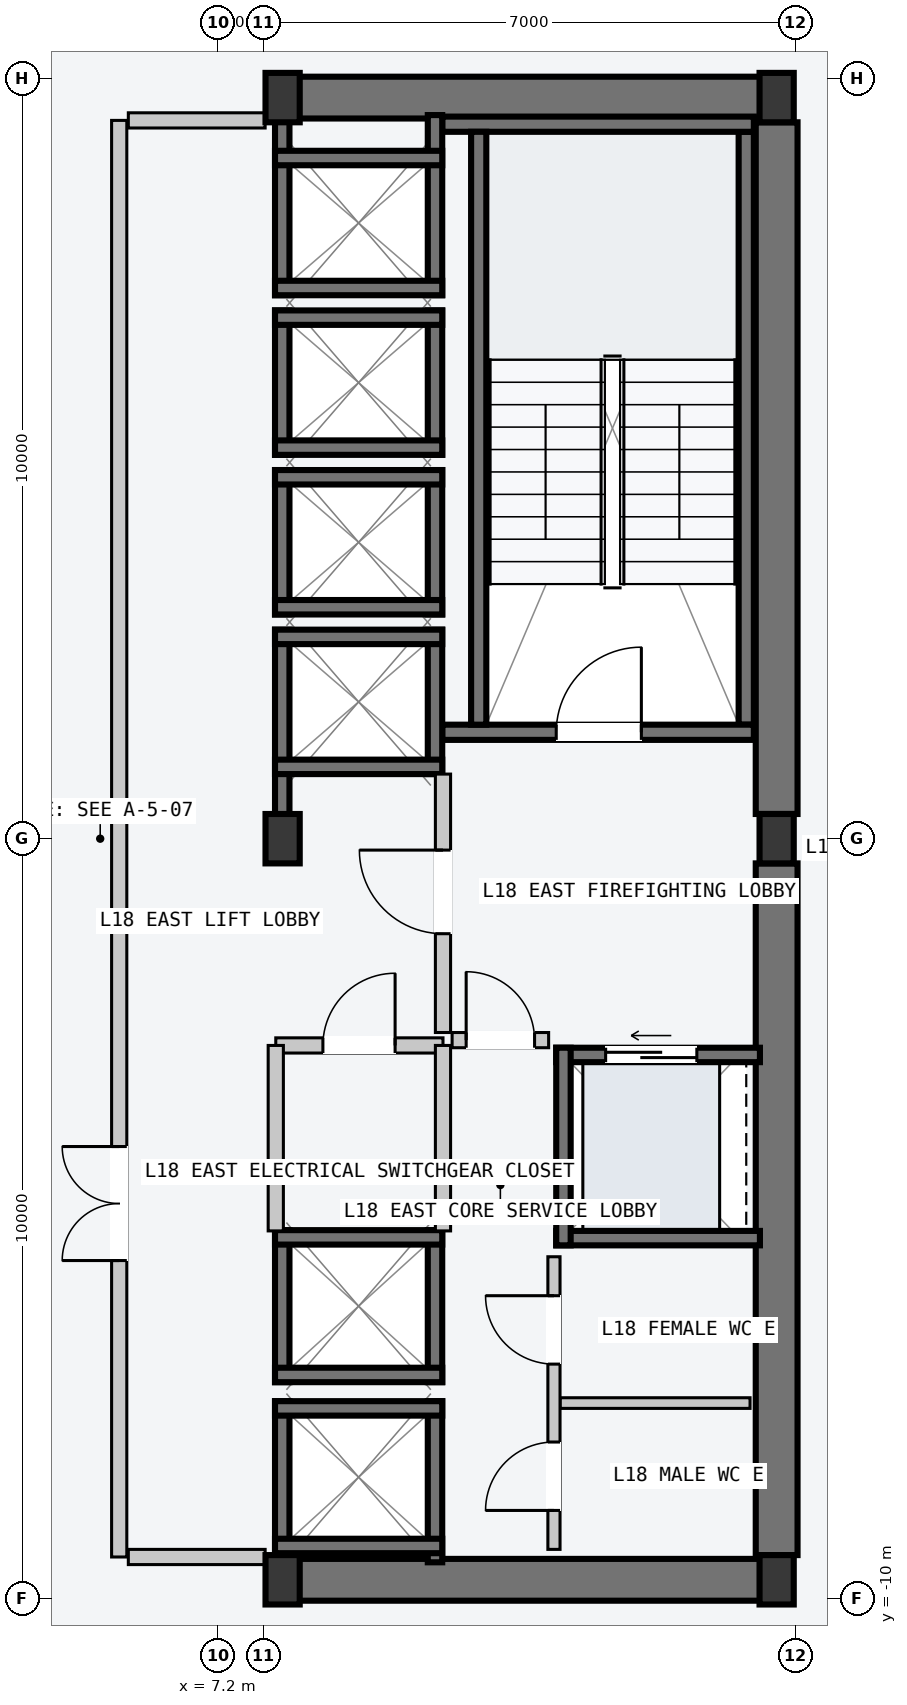
"""IFC4 building model, lengths in metres.
Left out: names, types, materials, properties, quantities, classifications, styles, units other than length and angle.
Written with IfcOpenShell. Run it as: python <this file> out.ifc"""

import sys

from ifc_helpers import new_model, si_unit, direction, frame, frame_2d, origin, origin_2d, place, context, subcontext, project, spatial, rectangle, i_section, extrude, element, fill, save


model = new_model("IFC4")
c1 = context("Model", 3, precision=1e-05, world=origin(), true_north=direction((0.0, 1.0)))
c2 = subcontext(c1, "Body", "Model", "MODEL_VIEW")
j1 = project(units=[si_unit("LENGTHUNIT", "METRE"), si_unit("PLANEANGLEUNIT", "RADIAN")], contexts=[c1])
p1 = place(None, origin())
s1 = spatial("IfcSite", under=j1, at=p1, CompositionType="ELEMENT")
p2 = place(p1, origin())
s2 = spatial("IfcBuilding", under=s1, at=p2, CompositionType="ELEMENT")
p3 = place(p2, frame((0.0, 0.0, 70.8)))
s3 = spatial("IfcBuildingStorey", under=s2, at=p3, CompositionType="ELEMENT", Elevation=70.8)
for number, where, z_axis, x_axis in (
    (1, (8.07, -9.75, -0.2), (0.0, 0.0, 1.0), (1.0, 0.0, 0.0)),
    (2, (8.07, 9.75, -0.2), (0.0, 0.0, 1.0), (1.0, 0.0, 0.0)),
):
    element("IfcWall", number, at=place(p3, frame(where, z_axis=z_axis, x_axis=x_axis)), inside=s3, PredefinedType="SHEAR", context=c2, shape_type="SweptSolid", body=[
        extrude(rectangle(XDim=6.46, YDim=0.55, at=frame_2d((3.23, 0.0))), origin(), (0.0, 0.0, 1.0), 3.6),
    ])
for number, where, z_axis, x_axis in (
    (3, (14.55, -9.425, -0.2), (0.0, 0.0, 1.0), (0.0, 1.0, 0.0)),
    (4, (14.55, 0.325, -0.2), (0.0, 0.0, 1.0), (0.0, 1.0, 0.0)),
):
    element("IfcWall", number, at=place(p3, frame(where, z_axis=z_axis, x_axis=x_axis)), inside=s3, PredefinedType="SHEAR", context=c2, shape_type="SweptSolid", body=[
        extrude(rectangle(XDim=9.1, YDim=0.55, at=frame_2d((4.55, 0.0))), origin(), (0.0, 0.0, 1.0), 3.6),
    ])
p4 = place(p3, frame((14.15, 1.5, -0.2), z_axis=(0.0, 0.0, 1.0), x_axis=(0.0, 1.0, 0.0)))
e5 = element("IfcWall", 5, at=p4, inside=s3, PredefinedType="SOLIDWALL", context=c2, shape_type="SweptSolid", body=[
    extrude(rectangle(XDim=7.8, YDim=0.2, at=frame_2d((3.9, 0.0))), origin(), (0.0, 0.0, 1.0), 3.6),
])
p5 = place(p3, frame((10.15, 1.4, -0.2), z_axis=(0.0, 0.0, 1.0), x_axis=(1.0, 0.0, 0.0)))
e6 = element("IfcWall", 6, at=p5, inside=s3, PredefinedType="SOLIDWALL", context=c2, shape_type="SweptSolid", body=[
    extrude(rectangle(XDim=4.1, YDim=0.2, at=frame_2d((2.05, 0.0))), origin(), (0.0, 0.0, 1.0), 3.6),
])
p6 = place(p5, frame((1.5, 0.0, 0.2)))
e7 = element("IfcOpeningElement", 7, at=p6, cuts=e6, PredefinedType="OPENING", context=c2, shape_type="SweptSolid", body=[
    extrude(rectangle(XDim=1.12, YDim=2.18, at=frame_2d((0.56, 1.09))), frame((0.0, 0.11, 0.0), z_axis=(0.0, -1.0, 0.0), x_axis=(1.0, 0.0, 0.0)), (0.0, 0.0, 1.0), 0.22),
])
p7 = place(p3, frame((10.15, 9.4, -0.2), z_axis=(0.0, 0.0, 1.0), x_axis=(1.0, 0.0, 0.0)))
e8 = element("IfcWall", 8, at=p7, inside=s3, PredefinedType="SOLIDWALL", context=c2, shape_type="SweptSolid", body=[
    extrude(rectangle(XDim=4.1, YDim=0.2, at=frame_2d((2.05, 0.0))), origin(), (0.0, 0.0, 1.0), 3.6),
])
p8 = place(p3, frame((10.63, 1.5, -0.2), z_axis=(0.0, 0.0, 1.0), x_axis=(0.0, 1.0, 0.0)))
e9 = element("IfcWall", 9, at=p8, inside=s3, PredefinedType="SOLIDWALL", context=c2, shape_type="SweptSolid", body=[
    extrude(rectangle(XDim=7.8, YDim=0.2, at=frame_2d((3.9, 0.0))), origin(), (0.0, 0.0, 1.0), 3.6),
])
for number, where, z_axis, x_axis in (
    (10, (8.05, -9.75, 0.0), (0.0, 0.0, 1.0), (1.0, 0.0, 0.0)),
    (11, (8.05, 0.0, 0.0), (0.0, 0.0, 1.0), (1.0, 0.0, 0.0)),
    (12, (8.05, 9.75, 0.0), (0.0, 0.0, 1.0), (1.0, 0.0, 0.0)),
    (13, (14.55, -9.75, 0.0), (0.0, 0.0, 1.0), (1.0, 0.0, 0.0)),
    (14, (14.55, 0.0, 0.0), (0.0, 0.0, 1.0), (1.0, 0.0, 0.0)),
    (15, (14.55, 9.75, 0.0), (0.0, 0.0, 1.0), (1.0, 0.0, 0.0)),
):
    element("IfcColumn", number, at=place(p3, frame(where, z_axis=z_axis, x_axis=x_axis)), inside=s3, PredefinedType="COLUMN", context=c2, shape_type="SweptSolid", body=[
        extrude(i_section(OverallWidth=0.45, OverallDepth=0.65, WebThickness=0.025, FlangeThickness=0.04, at=origin_2d()), origin(), (0.0, 0.0, 1.0), 3.6),
    ])
p9 = place(p3, frame((8.045, 0.21, -0.2), z_axis=(0.0, 0.0, 1.0), x_axis=(0.0, 1.0, 0.0)))
e16 = element("IfcWall", 16, at=p9, inside=s3, PredefinedType="SOLIDWALL", context=c2, shape_type="SweptSolid", body=[
    extrude(rectangle(XDim=2.54, YDim=0.19, at=frame_2d((1.27, 0.0))), origin(), (0.0, 0.0, 1.0), 3.6),
])
p10 = place(p3, frame((10.055, 0.85, -0.2), z_axis=(0.0, 0.0, 1.0), x_axis=(0.0, 1.0, 0.0)))
e17 = element("IfcWall", 17, at=p10, inside=s3, PredefinedType="SOLIDWALL", context=c2, shape_type="SweptSolid", body=[
    extrude(rectangle(XDim=1.9, YDim=0.19, at=frame_2d((0.95, 0.0))), origin(), (0.0, 0.0, 1.0), 3.6),
])
for number, where, z_axis, x_axis in (
    (18, (7.95, 2.655, -0.2), (0.0, 0.0, 1.0), (1.0, 0.0, 0.0)),
    (19, (7.95, 0.945, -0.2), (0.0, 0.0, 1.0), (1.0, 0.0, 0.0)),
):
    element("IfcWall", number, at=place(p3, frame(where, z_axis=z_axis, x_axis=x_axis)), inside=s3, PredefinedType="SOLIDWALL", context=c2, shape_type="SweptSolid", body=[
        extrude(rectangle(XDim=2.2, YDim=0.19, at=frame_2d((1.1, 0.0))), origin(), (0.0, 0.0, 1.0), 3.6),
    ])
for number, where, z_axis, x_axis in (
    (20, (8.045, 2.95, -0.2), (0.0, 0.0, 1.0), (0.0, 1.0, 0.0)),
    (21, (10.055, 2.95, -0.2), (0.0, 0.0, 1.0), (0.0, 1.0, 0.0)),
):
    element("IfcWall", number, at=place(p3, frame(where, z_axis=z_axis, x_axis=x_axis)), inside=s3, PredefinedType="SOLIDWALL", context=c2, shape_type="SweptSolid", body=[
        extrude(rectangle(XDim=1.9, YDim=0.19, at=frame_2d((0.95, 0.0))), origin(), (0.0, 0.0, 1.0), 3.6),
    ])
for number, where, z_axis, x_axis in (
    (22, (7.95, 4.755, -0.2), (0.0, 0.0, 1.0), (1.0, 0.0, 0.0)),
    (23, (7.95, 3.045, -0.2), (0.0, 0.0, 1.0), (1.0, 0.0, 0.0)),
):
    element("IfcWall", number, at=place(p3, frame(where, z_axis=z_axis, x_axis=x_axis)), inside=s3, PredefinedType="SOLIDWALL", context=c2, shape_type="SweptSolid", body=[
        extrude(rectangle(XDim=2.2, YDim=0.19, at=frame_2d((1.1, 0.0))), origin(), (0.0, 0.0, 1.0), 3.6),
    ])
for number, where, z_axis, x_axis in (
    (24, (8.045, 5.05, -0.2), (0.0, 0.0, 1.0), (0.0, 1.0, 0.0)),
    (25, (10.055, 5.05, -0.2), (0.0, 0.0, 1.0), (0.0, 1.0, 0.0)),
):
    element("IfcWall", number, at=place(p3, frame(where, z_axis=z_axis, x_axis=x_axis)), inside=s3, PredefinedType="SOLIDWALL", context=c2, shape_type="SweptSolid", body=[
        extrude(rectangle(XDim=1.9, YDim=0.19, at=frame_2d((0.95, 0.0))), origin(), (0.0, 0.0, 1.0), 3.6),
    ])
for number, where, z_axis, x_axis in (
    (26, (7.95, 6.855, -0.2), (0.0, 0.0, 1.0), (1.0, 0.0, 0.0)),
    (27, (7.95, 5.145, -0.2), (0.0, 0.0, 1.0), (1.0, 0.0, 0.0)),
):
    element("IfcWall", number, at=place(p3, frame(where, z_axis=z_axis, x_axis=x_axis)), inside=s3, PredefinedType="SOLIDWALL", context=c2, shape_type="SweptSolid", body=[
        extrude(rectangle(XDim=2.2, YDim=0.19, at=frame_2d((1.1, 0.0))), origin(), (0.0, 0.0, 1.0), 3.6),
    ])
for number, where, z_axis, x_axis in (
    (28, (8.045, 7.15, -0.2), (0.0, 0.0, 1.0), (0.0, 1.0, 0.0)),
    (29, (10.055, 7.15, -0.2), (0.0, 0.0, 1.0), (0.0, 1.0, 0.0)),
):
    element("IfcWall", number, at=place(p3, frame(where, z_axis=z_axis, x_axis=x_axis)), inside=s3, PredefinedType="SOLIDWALL", context=c2, shape_type="SweptSolid", body=[
        extrude(rectangle(XDim=2.37, YDim=0.19, at=frame_2d((1.185, 0.0))), origin(), (0.0, 0.0, 1.0), 3.6),
    ])
for number, where, z_axis, x_axis in (
    (30, (7.95, 8.955, -0.2), (0.0, 0.0, 1.0), (1.0, 0.0, 0.0)),
    (31, (7.95, 7.245, -0.2), (0.0, 0.0, 1.0), (1.0, 0.0, 0.0)),
):
    element("IfcWall", number, at=place(p3, frame(where, z_axis=z_axis, x_axis=x_axis)), inside=s3, PredefinedType="SOLIDWALL", context=c2, shape_type="SweptSolid", body=[
        extrude(rectangle(XDim=2.2, YDim=0.19, at=frame_2d((1.1, 0.0))), origin(), (0.0, 0.0, 1.0), 3.6),
    ])
for number, where, z_axis, x_axis in (
    (32, (8.045, -9.52, -0.2), (0.0, 0.0, 1.0), (0.0, 1.0, 0.0)),
    (33, (10.055, -9.52, -0.2), (0.0, 0.0, 1.0), (0.0, 1.0, 0.0)),
):
    element("IfcWall", number, at=place(p3, frame(where, z_axis=z_axis, x_axis=x_axis)), inside=s3, PredefinedType="SOLIDWALL", context=c2, shape_type="SweptSolid", body=[
        extrude(rectangle(XDim=2.12, YDim=0.19, at=frame_2d((1.06, 0.0))), origin(), (0.0, 0.0, 1.0), 3.6),
    ])
for number, where, z_axis, x_axis in (
    (34, (7.95, -7.495, -0.2), (0.0, 0.0, 1.0), (1.0, 0.0, 0.0)),
    (35, (7.95, -9.305, -0.2), (0.0, 0.0, 1.0), (1.0, 0.0, 0.0)),
):
    element("IfcWall", number, at=place(p3, frame(where, z_axis=z_axis, x_axis=x_axis)), inside=s3, PredefinedType="SOLIDWALL", context=c2, shape_type="SweptSolid", body=[
        extrude(rectangle(XDim=2.2, YDim=0.19, at=frame_2d((1.1, 0.0))), origin(), (0.0, 0.0, 1.0), 3.6),
    ])
for number, where, z_axis, x_axis in (
    (36, (8.045, -7.15, -0.2), (0.0, 0.0, 1.0), (0.0, 1.0, 0.0)),
    (37, (10.055, -7.15, -0.2), (0.0, 0.0, 1.0), (0.0, 1.0, 0.0)),
):
    element("IfcWall", number, at=place(p3, frame(where, z_axis=z_axis, x_axis=x_axis)), inside=s3, PredefinedType="SOLIDWALL", context=c2, shape_type="SweptSolid", body=[
        extrude(rectangle(XDim=2.0, YDim=0.19, at=frame_2d((1.0, 0.0))), origin(), (0.0, 0.0, 1.0), 3.6),
    ])
for number, where, z_axis, x_axis in (
    (38, (7.95, -5.245, -0.2), (0.0, 0.0, 1.0), (1.0, 0.0, 0.0)),
    (39, (7.95, -7.055, -0.2), (0.0, 0.0, 1.0), (1.0, 0.0, 0.0)),
):
    element("IfcWall", number, at=place(p3, frame(where, z_axis=z_axis, x_axis=x_axis)), inside=s3, PredefinedType="SOLIDWALL", context=c2, shape_type="SweptSolid", body=[
        extrude(rectangle(XDim=2.2, YDim=0.19, at=frame_2d((1.1, 0.0))), origin(), (0.0, 0.0, 1.0), 3.6),
    ])
p11 = place(p3, frame((11.65, -2.845, -0.2), z_axis=(0.0, 0.0, 1.0), x_axis=(1.0, 0.0, 0.0)))
e40 = element("IfcWall", 40, at=p11, inside=s3, PredefinedType="SOLIDWALL", context=c2, shape_type="SweptSolid", body=[
    extrude(rectangle(XDim=2.68, YDim=0.19, at=frame_2d((1.34, 0.0))), origin(), (0.0, 0.0, 1.0), 3.6),
])
p12 = place(p11, frame((0.65, 0.0, 0.2)))
e41 = element("IfcOpeningElement", 41, at=p12, cuts=e40, PredefinedType="OPENING", context=c2, shape_type="SweptSolid", body=[
    extrude(rectangle(XDim=1.2, YDim=2.2, at=frame_2d((0.6, 1.1))), frame((0.0, 0.105, 0.0), z_axis=(0.0, -1.0, 0.0), x_axis=(1.0, 0.0, 0.0)), (0.0, 0.0, 1.0), 0.21),
])
p13 = place(p3, frame((11.65, -5.255, -0.2), z_axis=(0.0, 0.0, 1.0), x_axis=(1.0, 0.0, 0.0)))
e42 = element("IfcWall", 42, at=p13, inside=s3, PredefinedType="SOLIDWALL", context=c2, shape_type="SweptSolid", body=[
    extrude(rectangle(XDim=2.68, YDim=0.19, at=frame_2d((1.34, 0.0))), origin(), (0.0, 0.0, 1.0), 3.6),
])
p14 = place(p3, frame((11.745, -5.35, -0.2), z_axis=(0.0, 0.0, 1.0), x_axis=(0.0, 1.0, 0.0)))
e43 = element("IfcWall", 43, at=p14, inside=s3, PredefinedType="SOLIDWALL", context=c2, shape_type="SweptSolid", body=[
    extrude(rectangle(XDim=2.6, YDim=0.19, at=frame_2d((1.3, 0.0))), origin(), (0.0, 0.0, 1.0), 3.6),
])
p15 = place(p3, frame((5.9, -9.45, 0.0), z_axis=(0.0, 0.0, 1.0), x_axis=(0.0, 1.0, 0.0)))
e44 = element("IfcWall", 44, at=p15, inside=s3, PredefinedType="PARTITIONING", context=c2, shape_type="SweptSolid", body=[
    extrude(rectangle(XDim=18.9, YDim=0.2, at=frame_2d((9.45, 0.0))), origin(), (0.0, 0.0, 1.0), 3.4),
])
p16 = place(p15, frame((3.9, 0.0, 0.0)))
e45 = element("IfcOpeningElement", 45, at=p16, cuts=e44, PredefinedType="OPENING", context=c2, shape_type="SweptSolid", body=[
    extrude(rectangle(XDim=1.5, YDim=2.2, at=frame_2d((0.75, 1.1))), frame((0.0, 0.11, 0.0), z_axis=(0.0, -1.0, 0.0), x_axis=(1.0, 0.0, 0.0)), (0.0, 0.0, 1.0), 0.22),
])
for number, where, z_axis, x_axis in (
    (46, (6.02, -9.45, 0.0), (0.0, 0.0, 1.0), (1.0, 0.0, 0.0)),
    (47, (6.02, 9.45, 0.0), (0.0, 0.0, 1.0), (1.0, 0.0, 0.0)),
):
    element("IfcWall", number, at=place(p3, frame(where, z_axis=z_axis, x_axis=x_axis)), inside=s3, PredefinedType="PARTITIONING", context=c2, shape_type="SweptSolid", body=[
        extrude(rectangle(XDim=1.8, YDim=0.2, at=frame_2d((0.9, 0.0))), origin(), (0.0, 0.0, 1.0), 3.4),
    ])
p17 = place(p3, frame((10.16, -2.55, 0.0), z_axis=(0.0, 0.0, 1.0), x_axis=(0.0, 1.0, 0.0)))
e48 = element("IfcWall", 48, at=p17, inside=s3, PredefinedType="PARTITIONING", context=c2, shape_type="SweptSolid", body=[
    extrude(rectangle(XDim=3.4, YDim=0.2, at=frame_2d((1.7, 0.0))), origin(), (0.0, 0.0, 1.0), 3.4),
])
p18 = place(p17, frame((1.3, 0.0, 0.0)))
e49 = element("IfcOpeningElement", 49, at=p18, cuts=e48, PredefinedType="OPENING", context=c2, shape_type="SweptSolid", body=[
    extrude(rectangle(XDim=1.1, YDim=2.15, at=frame_2d((0.55, 1.075))), frame((0.0, 0.11, 0.0), z_axis=(0.0, -1.0, 0.0), x_axis=(1.0, 0.0, 0.0)), (0.0, 0.0, 1.0), 0.22),
])
p19 = place(p3, frame((10.28, -2.65, 0.0), z_axis=(0.0, 0.0, 1.0), x_axis=(1.0, 0.0, 0.0)))
e50 = element("IfcWall", 50, at=p19, inside=s3, PredefinedType="PARTITIONING", context=c2, shape_type="SweptSolid", body=[
    extrude(rectangle(XDim=1.27, YDim=0.2, at=frame_2d((0.635, 0.0))), origin(), (0.0, 0.0, 1.0), 3.4),
])
p20 = place(p19, frame((0.185, 0.0, 0.0)))
e51 = element("IfcOpeningElement", 51, at=p20, cuts=e50, PredefinedType="OPENING", context=c2, shape_type="SweptSolid", body=[
    extrude(rectangle(XDim=0.9, YDim=2.15, at=frame_2d((0.45, 1.075))), frame((0.0, 0.11, 0.0), z_axis=(0.0, -1.0, 0.0), x_axis=(1.0, 0.0, 0.0)), (0.0, 0.0, 1.0), 0.22),
])
p21 = place(p3, frame((7.96, -2.72, 0.0), z_axis=(0.0, 0.0, 1.0), x_axis=(1.0, 0.0, 0.0)))
e52 = element("IfcWall", 52, at=p21, inside=s3, PredefinedType="PARTITIONING", context=c2, shape_type="SweptSolid", body=[
    extrude(rectangle(XDim=2.2, YDim=0.2, at=frame_2d((1.1, 0.0))), origin(), (0.0, 0.0, 1.0), 3.4),
])
p22 = place(p21, frame((0.62, 0.0, 0.0)))
e53 = element("IfcOpeningElement", 53, at=p22, cuts=e52, PredefinedType="OPENING", context=c2, shape_type="SweptSolid", body=[
    extrude(rectangle(XDim=0.95, YDim=2.1, at=frame_2d((0.475, 1.05))), frame((0.0, 0.11, 0.0), z_axis=(0.0, -1.0, 0.0), x_axis=(1.0, 0.0, 0.0)), (0.0, 0.0, 1.0), 0.22),
])
for number, where, z_axis, x_axis in (
    (54, (7.96, -5.16, 0.0), (0.0, 0.0, 1.0), (0.0, 1.0, 0.0)),
    (55, (10.16, -5.16, 0.0), (0.0, 0.0, 1.0), (0.0, 1.0, 0.0)),
):
    element("IfcWall", number, at=place(p3, frame(where, z_axis=z_axis, x_axis=x_axis)), inside=s3, PredefinedType="PARTITIONING", context=c2, shape_type="SweptSolid", body=[
        extrude(rectangle(XDim=2.44, YDim=0.2, at=frame_2d((1.22, 0.0))), origin(), (0.0, 0.0, 1.0), 3.4),
    ])
p23 = place(p3, frame((11.7, -7.425, 0.0), z_axis=(0.0, 0.0, 1.0), x_axis=(1.0, 0.0, 0.0)))
e56 = element("IfcWall", 56, at=p23, inside=s3, PredefinedType="PARTITIONING", context=c2, shape_type="SweptSolid", body=[
    extrude(rectangle(XDim=2.5, YDim=0.14, at=frame_2d((1.25, 0.0))), origin(), (0.0, 0.0, 1.0), 3.4),
])
p24 = place(p3, frame((11.62, -9.35, 0.0), z_axis=(0.0, 0.0, 1.0), x_axis=(0.0, 1.0, 0.0)))
e57 = element("IfcWall", 57, at=p24, inside=s3, PredefinedType="PARTITIONING", context=c2, shape_type="SweptSolid", body=[
    extrude(rectangle(XDim=3.85, YDim=0.16, at=frame_2d((1.925, 0.0))), origin(), (0.0, 0.0, 1.0), 3.4),
])
p25 = place(p24, frame((0.512, 0.0, 0.0)))
e58 = element("IfcOpeningElement", 58, at=p25, cuts=e57, PredefinedType="OPENING", context=c2, shape_type="SweptSolid", body=[
    extrude(rectangle(XDim=0.9, YDim=2.15, at=frame_2d((0.45, 1.075))), frame((0.0, 0.09, 0.0), z_axis=(0.0, -1.0, 0.0), x_axis=(1.0, 0.0, 0.0)), (0.0, 0.0, 1.0), 0.18),
])
p26 = place(p24, frame((2.438, 0.0, 0.0)))
e59 = element("IfcOpeningElement", 59, at=p26, cuts=e57, PredefinedType="OPENING", context=c2, shape_type="SweptSolid", body=[
    extrude(rectangle(XDim=0.9, YDim=2.15, at=frame_2d((0.45, 1.075))), frame((0.0, 0.09, 0.0), z_axis=(0.0, -1.0, 0.0), x_axis=(1.0, 0.0, 0.0)), (0.0, 0.0, 1.0), 0.18),
])
p27 = place(p6, origin())
e60 = element("IfcDoor", 60, at=p27, inside=s3, OperationType="SINGLE_SWING_RIGHT", PredefinedType="DOOR", context=c2, shape_type="SweptSolid", body=[
    extrude(rectangle(XDim=1.12, YDim=2.18, at=frame_2d((0.56, 1.09))), frame((0.0, 0.025, 0.0), z_axis=(0.0, -1.0, 0.0), x_axis=(1.0, 0.0, 0.0)), (0.0, 0.0, 1.0), 0.05),
])
fill(e7, e60)
p28 = place(p12, origin())
e61 = element("IfcDoor", 61, at=p28, inside=s3, OperationType="SLIDING_TO_LEFT", PredefinedType="DOOR", context=c2, shape_type="SweptSolid", body=[
    extrude(rectangle(XDim=1.2, YDim=2.2, at=frame_2d((0.6, 1.1))), frame((0.0, 0.025, 0.0), z_axis=(0.0, -1.0, 0.0), x_axis=(1.0, 0.0, 0.0)), (0.0, 0.0, 1.0), 0.05),
])
fill(e41, e61)
p29 = place(p16, origin())
e62 = element("IfcDoor", 62, at=p29, inside=s3, OperationType="DOUBLE_DOOR_SINGLE_SWING", PredefinedType="DOOR", context=c2, shape_type="SweptSolid", body=[
    extrude(rectangle(XDim=1.5, YDim=2.2, at=frame_2d((0.75, 1.1))), frame((0.0, 0.025, 0.0), z_axis=(0.0, -1.0, 0.0), x_axis=(1.0, 0.0, 0.0)), (0.0, 0.0, 1.0), 0.05),
])
fill(e45, e62)
p30 = place(p18, origin())
e63 = element("IfcDoor", 63, at=p30, inside=s3, OperationType="SINGLE_SWING_RIGHT", PredefinedType="DOOR", context=c2, shape_type="SweptSolid", body=[
    extrude(rectangle(XDim=1.1, YDim=2.15, at=frame_2d((0.55, 1.075))), frame((0.0, 0.025, 0.0), z_axis=(0.0, -1.0, 0.0), x_axis=(1.0, 0.0, 0.0)), (0.0, 0.0, 1.0), 0.05),
])
fill(e49, e63)
p31 = place(p20, origin())
e64 = element("IfcDoor", 64, at=p31, inside=s3, OperationType="SINGLE_SWING_LEFT", PredefinedType="DOOR", context=c2, shape_type="SweptSolid", body=[
    extrude(rectangle(XDim=0.9, YDim=2.15, at=frame_2d((0.45, 1.075))), frame((0.0, 0.025, 0.0), z_axis=(0.0, -1.0, 0.0), x_axis=(1.0, 0.0, 0.0)), (0.0, 0.0, 1.0), 0.05),
])
fill(e51, e64)
p32 = place(p22, origin())
e65 = element("IfcDoor", 65, at=p32, inside=s3, OperationType="SINGLE_SWING_RIGHT", PredefinedType="DOOR", context=c2, shape_type="SweptSolid", body=[
    extrude(rectangle(XDim=0.95, YDim=2.1, at=frame_2d((0.475, 1.05))), frame((0.0, 0.025, 0.0), z_axis=(0.0, -1.0, 0.0), x_axis=(1.0, 0.0, 0.0)), (0.0, 0.0, 1.0), 0.05),
])
fill(e53, e65)
p33 = place(p25, origin())
e66 = element("IfcDoor", 66, at=p33, inside=s3, OperationType="SINGLE_SWING_LEFT", PredefinedType="DOOR", context=c2, shape_type="SweptSolid", body=[
    extrude(rectangle(XDim=0.9, YDim=2.15, at=frame_2d((0.45, 1.075))), frame((0.0, 0.025, 0.0), z_axis=(0.0, -1.0, 0.0), x_axis=(1.0, 0.0, 0.0)), (0.0, 0.0, 1.0), 0.05),
])
fill(e58, e66)
p34 = place(p26, origin())
e67 = element("IfcDoor", 67, at=p34, inside=s3, OperationType="SINGLE_SWING_RIGHT", PredefinedType="DOOR", context=c2, shape_type="SweptSolid", body=[
    extrude(rectangle(XDim=0.9, YDim=2.15, at=frame_2d((0.45, 1.075))), frame((0.0, 0.025, 0.0), z_axis=(0.0, -1.0, 0.0), x_axis=(1.0, 0.0, 0.0)), (0.0, 0.0, 1.0), 0.05),
])
fill(e59, e67)
save(model, sys.argv[1])
